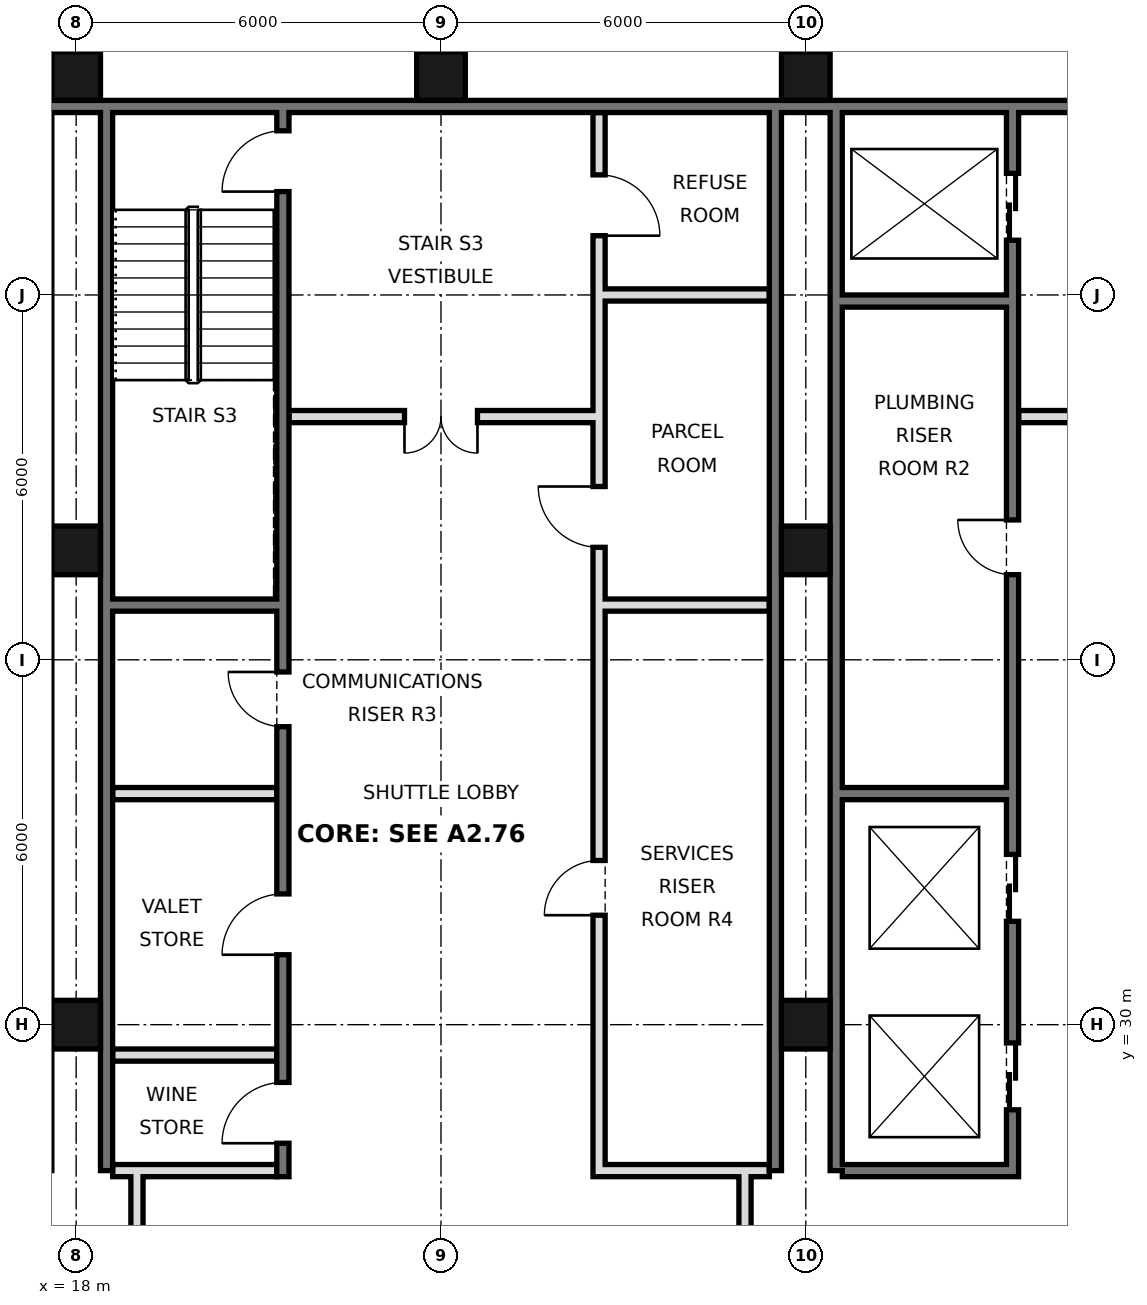
"""IFC4 building model, lengths in metres.
Left out: names, types, materials, properties, quantities, classifications, styles, units other than length and angle.
Written with IfcOpenShell. Run it as: python <this file> out.ifc"""

import sys

from ifc_helpers import new_model, si_unit, direction, frame, frame_2d, origin, origin_2d, place, context, subcontext, project, spatial, rectangle, hollow_rectangle, extrude, element, fill, save


model = new_model("IFC4")
c1 = context("Model", 3, precision=1e-05, world=origin(), true_north=direction((0.0, 1.0)))
c2 = subcontext(c1, "Body", "Model", "MODEL_VIEW")
j1 = project(units=[si_unit("LENGTHUNIT", "METRE"), si_unit("PLANEANGLEUNIT", "RADIAN")], contexts=[c1])
p1 = place(None, origin())
s1 = spatial("IfcSite", under=j1, at=p1, CompositionType="ELEMENT")
p2 = place(p1, origin())
s2 = spatial("IfcBuilding", under=s1, at=p2, CompositionType="ELEMENT")
p3 = place(p2, frame((0.0, 0.0, 305.2)))
s3 = spatial("IfcBuildingStorey", under=s2, at=p3, CompositionType="ELEMENT", Elevation=305.2)
for number, where, z_axis, x_axis in (
    (1, (18.0, 30.0, 0.0), (0.0, 0.0, 1.0), (1.0, 0.0, 0.0)),
    (2, (18.0, 37.8, 0.0), (0.0, 0.0, 1.0), (1.0, 0.0, 0.0)),
    (3, (18.0, 45.6, 0.0), (0.0, 0.0, 1.0), (1.0, 0.0, 0.0)),
    (4, (24.0, 45.6, 0.0), (0.0, 0.0, 1.0), (1.0, 0.0, 0.0)),
    (5, (30.0, 30.0, 0.0), (0.0, 0.0, 1.0), (1.0, 0.0, 0.0)),
    (6, (30.0, 37.8, 0.0), (0.0, 0.0, 1.0), (1.0, 0.0, 0.0)),
    (7, (30.0, 45.6, 0.0), (0.0, 0.0, 1.0), (1.0, 0.0, 0.0)),
):
    element("IfcColumn", number, at=place(p3, frame(where, z_axis=z_axis, x_axis=x_axis)), inside=s3, PredefinedType="COLUMN", context=c2, shape_type="SweptSolid", body=[
        extrude(hollow_rectangle(XDim=0.8, YDim=0.8, WallThickness=0.025, at=origin_2d()), origin(), (0.0, 0.0, 1.0), 3.6),
    ])
p4 = place(p3, frame((6.6, 45.1, 0.0), z_axis=(0.0, 0.0, 1.0), x_axis=(1.0, 0.0, 0.0)))
e8 = element("IfcWall", 8, at=p4, inside=s3, PredefinedType="SOLIDWALL", context=c2, shape_type="SweptSolid", body=[
    extrude(rectangle(XDim=34.8, YDim=0.2, at=frame_2d((17.4, 0.0))), origin(), (0.0, 0.0, 1.0), 3.42),
])
for number, where, z_axis, x_axis in (
    (9, (18.5, 27.6, 0.0), (0.0, 0.0, 1.0), (0.0, 1.0, 0.0)),
    (10, (29.5, 27.6, 0.0), (0.0, 0.0, 1.0), (0.0, 1.0, 0.0)),
    (11, (30.5, 27.6, 0.0), (0.0, 0.0, 1.0), (0.0, 1.0, 0.0)),
):
    element("IfcWall", number, at=place(p3, frame(where, z_axis=z_axis, x_axis=x_axis)), inside=s3, PredefinedType="SOLIDWALL", context=c2, shape_type="SweptSolid", body=[
        extrude(rectangle(XDim=17.5, YDim=0.2, at=frame_2d((8.75, 0.0))), origin(), (0.0, 0.0, 1.0), 3.42),
    ])
p5 = place(p3, frame((19.0, 21.6, 0.0), z_axis=(0.0, 0.0, 1.0), x_axis=(0.0, 1.0, 0.0)))
e12 = element("IfcWall", 12, at=p5, inside=s3, PredefinedType="PARTITIONING", context=c2, shape_type="SweptSolid", body=[
    extrude(rectangle(XDim=6.0, YDim=0.2, at=frame_2d((3.0, 0.0))), origin(), (0.0, 0.0, 1.0), 3.42),
])
p6 = place(p5, frame((2.1, 0.0, 0.0)))
e13 = element("IfcOpeningElement", 13, at=p6, cuts=e12, PredefinedType="OPENING", context=c2, shape_type="SweptSolid", body=[
    extrude(rectangle(XDim=1.8, YDim=2.1, at=frame_2d((0.9, 1.05))), frame((0.0, 0.11, 0.0), z_axis=(0.0, -1.0, 0.0), x_axis=(1.0, 0.0, 0.0)), (0.0, 0.0, 1.0), 0.22),
])
p7 = place(p3, frame((29.0, 21.6, 0.0), z_axis=(0.0, 0.0, 1.0), x_axis=(0.0, 1.0, 0.0)))
e14 = element("IfcWall", 14, at=p7, inside=s3, PredefinedType="PARTITIONING", context=c2, shape_type="SweptSolid", body=[
    extrude(rectangle(XDim=6.0, YDim=0.2, at=frame_2d((3.0, 0.0))), origin(), (0.0, 0.0, 1.0), 3.42),
])
p8 = place(p7, frame((2.1, 0.0, 0.0)))
e15 = element("IfcOpeningElement", 15, at=p8, cuts=e14, PredefinedType="OPENING", context=c2, shape_type="SweptSolid", body=[
    extrude(rectangle(XDim=1.8, YDim=2.1, at=frame_2d((0.9, 1.05))), frame((0.0, 0.11, 0.0), z_axis=(0.0, -1.0, 0.0), x_axis=(1.0, 0.0, 0.0)), (0.0, 0.0, 1.0), 0.22),
])
p9 = place(p3, frame((21.4, 27.5, 0.0), z_axis=(0.0, 0.0, 1.0), x_axis=(0.0, 1.0, 0.0)))
e16 = element("IfcWall", 16, at=p9, inside=s3, PredefinedType="SOLIDWALL", context=c2, shape_type="SweptSolid", body=[
    extrude(rectangle(XDim=17.5, YDim=0.2, at=frame_2d((8.75, 0.0))), origin(), (0.0, 0.0, 1.0), 3.42),
])
p10 = place(p9, frame((0.55, 0.0, 0.0)))
e17 = element("IfcOpeningElement", 17, at=p10, cuts=e16, PredefinedType="OPENING", context=c2, shape_type="SweptSolid", body=[
    extrude(rectangle(XDim=1.0, YDim=2.1, at=frame_2d((0.5, 1.05))), frame((0.0, 0.11, 0.0), z_axis=(0.0, -1.0, 0.0), x_axis=(1.0, 0.0, 0.0)), (0.0, 0.0, 1.0), 0.22),
])
p11 = place(p9, frame((3.65, 0.0, 0.0)))
e18 = element("IfcOpeningElement", 18, at=p11, cuts=e16, PredefinedType="OPENING", context=c2, shape_type="SweptSolid", body=[
    extrude(rectangle(XDim=1.0, YDim=2.1, at=frame_2d((0.5, 1.05))), frame((0.0, 0.11, 0.0), z_axis=(0.0, -1.0, 0.0), x_axis=(1.0, 0.0, 0.0)), (0.0, 0.0, 1.0), 0.22),
])
p12 = place(p9, frame((16.2, 0.0, 0.0)))
e19 = element("IfcOpeningElement", 19, at=p12, cuts=e16, PredefinedType="OPENING", context=c2, shape_type="SweptSolid", body=[
    extrude(rectangle(XDim=1.0, YDim=2.1, at=frame_2d((0.5, 1.05))), frame((0.0, 0.11, 0.0), z_axis=(0.0, -1.0, 0.0), x_axis=(1.0, 0.0, 0.0)), (0.0, 0.0, 1.0), 0.22),
])
p13 = place(p9, frame((7.4, 0.0, 0.0)))
e20 = element("IfcOpeningElement", 20, at=p13, cuts=e16, PredefinedType="OPENING", context=c2, shape_type="SweptSolid", body=[
    extrude(rectangle(XDim=0.9, YDim=2.1, at=frame_2d((0.45, 1.05))), frame((0.0, 0.11, 0.0), z_axis=(0.0, -1.0, 0.0), x_axis=(1.0, 0.0, 0.0)), (0.0, 0.0, 1.0), 0.22),
])
p14 = place(p3, frame((26.6, 27.5, 0.0), z_axis=(0.0, 0.0, 1.0), x_axis=(0.0, 1.0, 0.0)))
e21 = element("IfcWall", 21, at=p14, inside=s3, PredefinedType="SOLIDWALL", context=c2, shape_type="SweptSolid", body=[
    extrude(rectangle(XDim=17.5, YDim=0.2, at=frame_2d((8.75, 0.0))), origin(), (0.0, 0.0, 1.0), 3.42),
])
p15 = place(p14, frame((4.3, 0.0, 0.0)))
e22 = element("IfcOpeningElement", 22, at=p15, cuts=e21, PredefinedType="OPENING", context=c2, shape_type="SweptSolid", body=[
    extrude(rectangle(XDim=0.9, YDim=2.1, at=frame_2d((0.45, 1.05))), frame((0.0, 0.11, 0.0), z_axis=(0.0, -1.0, 0.0), x_axis=(1.0, 0.0, 0.0)), (0.0, 0.0, 1.0), 0.22),
])
p16 = place(p14, frame((10.35, 0.0, 0.0)))
e23 = element("IfcOpeningElement", 23, at=p16, cuts=e21, PredefinedType="OPENING", context=c2, shape_type="SweptSolid", body=[
    extrude(rectangle(XDim=1.0, YDim=2.1, at=frame_2d((0.5, 1.05))), frame((0.0, 0.11, 0.0), z_axis=(0.0, -1.0, 0.0), x_axis=(1.0, 0.0, 0.0)), (0.0, 0.0, 1.0), 0.22),
])
p17 = place(p14, frame((15.475, 0.0, 0.0)))
e24 = element("IfcOpeningElement", 24, at=p17, cuts=e21, PredefinedType="OPENING", context=c2, shape_type="SweptSolid", body=[
    extrude(rectangle(XDim=1.0, YDim=2.1, at=frame_2d((0.5, 1.05))), frame((0.0, 0.11, 0.0), z_axis=(0.0, -1.0, 0.0), x_axis=(1.0, 0.0, 0.0)), (0.0, 0.0, 1.0), 0.22),
])
p18 = place(p3, frame((33.4, 27.5, 0.0), z_axis=(0.0, 0.0, 1.0), x_axis=(0.0, 1.0, 0.0)))
e25 = element("IfcWall", 25, at=p18, inside=s3, PredefinedType="SOLIDWALL", context=c2, shape_type="SweptSolid", body=[
    extrude(rectangle(XDim=17.5, YDim=0.2, at=frame_2d((8.75, 0.0))), origin(), (0.0, 0.0, 1.0), 3.42),
])
p19 = place(p18, frame((1.1, 0.0, 0.0)))
e26 = element("IfcOpeningElement", 26, at=p19, cuts=e25, PredefinedType="OPENING", context=c2, shape_type="SweptSolid", body=[
    extrude(rectangle(XDim=1.1, YDim=2.1, at=frame_2d((0.55, 1.05))), frame((0.0, 0.11, 0.0), z_axis=(0.0, -1.0, 0.0), x_axis=(1.0, 0.0, 0.0)), (0.0, 0.0, 1.0), 0.22),
])
p20 = place(p18, frame((4.2, 0.0, 0.0)))
e27 = element("IfcOpeningElement", 27, at=p20, cuts=e25, PredefinedType="OPENING", context=c2, shape_type="SweptSolid", body=[
    extrude(rectangle(XDim=1.1, YDim=2.1, at=frame_2d((0.55, 1.05))), frame((0.0, 0.11, 0.0), z_axis=(0.0, -1.0, 0.0), x_axis=(1.0, 0.0, 0.0)), (0.0, 0.0, 1.0), 0.22),
])
p21 = place(p18, frame((15.4, 0.0, 0.0)))
e28 = element("IfcOpeningElement", 28, at=p21, cuts=e25, PredefinedType="OPENING", context=c2, shape_type="SweptSolid", body=[
    extrude(rectangle(XDim=1.1, YDim=2.1, at=frame_2d((0.55, 1.05))), frame((0.0, 0.11, 0.0), z_axis=(0.0, -1.0, 0.0), x_axis=(1.0, 0.0, 0.0)), (0.0, 0.0, 1.0), 0.22),
])
p22 = place(p18, frame((9.9, 0.0, 0.0)))
e29 = element("IfcOpeningElement", 29, at=p22, cuts=e25, PredefinedType="OPENING", context=c2, shape_type="SweptSolid", body=[
    extrude(rectangle(XDim=0.9, YDim=2.1, at=frame_2d((0.45, 1.05))), frame((0.0, 0.11, 0.0), z_axis=(0.0, -1.0, 0.0), x_axis=(1.0, 0.0, 0.0)), (0.0, 0.0, 1.0), 0.22),
])
p23 = place(p3, frame((18.6, 27.6, 0.0), z_axis=(0.0, 0.0, 1.0), x_axis=(1.0, 0.0, 0.0)))
e30 = element("IfcWall", 30, at=p23, inside=s3, PredefinedType="PARTITIONING", context=c2, shape_type="SweptSolid", body=[
    extrude(rectangle(XDim=2.7, YDim=0.2, at=frame_2d((1.35, 0.0))), origin(), (0.0, 0.0, 1.0), 3.42),
])
for number, where, z_axis, x_axis in (
    (31, (26.7, 27.6, 0.0), (0.0, 0.0, 1.0), (1.0, 0.0, 0.0)),
    (32, (30.6, 27.6, 0.0), (0.0, 0.0, 1.0), (1.0, 0.0, 0.0)),
):
    element("IfcWall", number, at=place(p3, frame(where, z_axis=z_axis, x_axis=x_axis)), inside=s3, PredefinedType="SOLIDWALL", context=c2, shape_type="SweptSolid", body=[
        extrude(rectangle(XDim=2.7, YDim=0.2, at=frame_2d((1.35, 0.0))), origin(), (0.0, 0.0, 1.0), 3.42),
    ])
p24 = place(p3, frame((18.6, 29.5, 0.0), z_axis=(0.0, 0.0, 1.0), x_axis=(1.0, 0.0, 0.0)))
e33 = element("IfcWall", 33, at=p24, inside=s3, PredefinedType="PARTITIONING", context=c2, shape_type="SweptSolid", body=[
    extrude(rectangle(XDim=2.7, YDim=0.2, at=frame_2d((1.35, 0.0))), origin(), (0.0, 0.0, 1.0), 3.42),
])
for number, where, z_axis, x_axis in (
    (34, (18.6, 33.8, 0.0), (0.0, 0.0, 1.0), (1.0, 0.0, 0.0)),
    (35, (30.6, 33.8, 0.0), (0.0, 0.0, 1.0), (1.0, 0.0, 0.0)),
    (36, (18.6, 36.9, 0.0), (0.0, 0.0, 1.0), (1.0, 0.0, 0.0)),
    (37, (26.7, 36.9, 0.0), (0.0, 0.0, 1.0), (1.0, 0.0, 0.0)),
):
    element("IfcWall", number, at=place(p3, frame(where, z_axis=z_axis, x_axis=x_axis)), inside=s3, PredefinedType="SOLIDWALL", context=c2, shape_type="SweptSolid", body=[
        extrude(rectangle(XDim=2.7, YDim=0.2, at=frame_2d((1.35, 0.0))), origin(), (0.0, 0.0, 1.0), 3.42),
    ])
p25 = place(p3, frame((21.5, 40.0, 0.0), z_axis=(0.0, 0.0, 1.0), x_axis=(1.0, 0.0, 0.0)))
e38 = element("IfcWall", 38, at=p25, inside=s3, PredefinedType="PARTITIONING", context=c2, shape_type="SweptSolid", body=[
    extrude(rectangle(XDim=5.0, YDim=0.2, at=frame_2d((2.5, 0.0))), origin(), (0.0, 0.0, 1.0), 3.42),
])
p26 = place(p25, frame((1.9, 0.0, 0.0)))
e39 = element("IfcOpeningElement", 39, at=p26, cuts=e38, PredefinedType="OPENING", context=c2, shape_type="SweptSolid", body=[
    extrude(rectangle(XDim=1.2, YDim=2.1, at=frame_2d((0.6, 1.05))), frame((0.0, 0.11, 0.0), z_axis=(0.0, -1.0, 0.0), x_axis=(1.0, 0.0, 0.0)), (0.0, 0.0, 1.0), 0.22),
])
p27 = place(p3, frame((33.5, 40.0, 0.0), z_axis=(0.0, 0.0, 1.0), x_axis=(1.0, 0.0, 0.0)))
e40 = element("IfcWall", 40, at=p27, inside=s3, PredefinedType="PARTITIONING", context=c2, shape_type="SweptSolid", body=[
    extrude(rectangle(XDim=5.0, YDim=0.2, at=frame_2d((2.5, 0.0))), origin(), (0.0, 0.0, 1.0), 3.42),
])
p28 = place(p27, frame((1.9, 0.0, 0.0)))
e41 = element("IfcOpeningElement", 41, at=p28, cuts=e40, PredefinedType="OPENING", context=c2, shape_type="SweptSolid", body=[
    extrude(rectangle(XDim=1.2, YDim=2.1, at=frame_2d((0.6, 1.05))), frame((0.0, 0.11, 0.0), z_axis=(0.0, -1.0, 0.0), x_axis=(1.0, 0.0, 0.0)), (0.0, 0.0, 1.0), 0.22),
])
p29 = place(p3, frame((30.6, 41.9, 0.0), z_axis=(0.0, 0.0, 1.0), x_axis=(1.0, 0.0, 0.0)))
e42 = element("IfcWall", 42, at=p29, inside=s3, PredefinedType="SOLIDWALL", context=c2, shape_type="SweptSolid", body=[
    extrude(rectangle(XDim=2.7, YDim=0.2, at=frame_2d((1.35, 0.0))), origin(), (0.0, 0.0, 1.0), 3.42),
])
p30 = place(p3, frame((26.7, 42.0, 0.0), z_axis=(0.0, 0.0, 1.0), x_axis=(1.0, 0.0, 0.0)))
e43 = element("IfcWall", 43, at=p30, inside=s3, PredefinedType="PARTITIONING", context=c2, shape_type="SweptSolid", body=[
    extrude(rectangle(XDim=2.7, YDim=0.2, at=frame_2d((1.35, 0.0))), origin(), (0.0, 0.0, 1.0), 3.42),
])
p31 = place(p26, frame((1.2, 0.0, 0.0), z_axis=(0.0, 0.0, 1.0), x_axis=(-1.0, 0.0, 0.0)))
e44 = element("IfcDoor", 44, at=p31, inside=s3, OperationType="DOUBLE_DOOR_SINGLE_SWING", PredefinedType="DOOR", context=c2, shape_type="SweptSolid", body=[
    extrude(rectangle(XDim=1.2, YDim=2.1, at=frame_2d((0.6, 1.05))), frame((0.0, 0.025, 0.0), z_axis=(0.0, -1.0, 0.0), x_axis=(1.0, 0.0, 0.0)), (0.0, 0.0, 1.0), 0.05),
])
fill(e39, e44)
p32 = place(p19, origin())
e45 = element("IfcDoor", 45, at=p32, inside=s3, OperationType="DOUBLE_DOOR_SLIDING", PredefinedType="DOOR", context=c2, shape_type="SweptSolid", body=[
    extrude(rectangle(XDim=1.1, YDim=2.1, at=frame_2d((0.55, 1.05))), frame((0.0, 0.025, 0.0), z_axis=(0.0, -1.0, 0.0), x_axis=(1.0, 0.0, 0.0)), (0.0, 0.0, 1.0), 0.05),
])
fill(e26, e45)
p33 = place(p20, origin())
e46 = element("IfcDoor", 46, at=p33, inside=s3, OperationType="DOUBLE_DOOR_SLIDING", PredefinedType="DOOR", context=c2, shape_type="SweptSolid", body=[
    extrude(rectangle(XDim=1.1, YDim=2.1, at=frame_2d((0.55, 1.05))), frame((0.0, 0.025, 0.0), z_axis=(0.0, -1.0, 0.0), x_axis=(1.0, 0.0, 0.0)), (0.0, 0.0, 1.0), 0.05),
])
fill(e27, e46)
p34 = place(p21, origin())
e47 = element("IfcDoor", 47, at=p34, inside=s3, OperationType="DOUBLE_DOOR_SLIDING", PredefinedType="DOOR", context=c2, shape_type="SweptSolid", body=[
    extrude(rectangle(XDim=1.1, YDim=2.1, at=frame_2d((0.55, 1.05))), frame((0.0, 0.025, 0.0), z_axis=(0.0, -1.0, 0.0), x_axis=(1.0, 0.0, 0.0)), (0.0, 0.0, 1.0), 0.05),
])
fill(e28, e47)
p35 = place(p10, origin())
e48 = element("IfcDoor", 48, at=p35, inside=s3, OperationType="SINGLE_SWING_LEFT", PredefinedType="DOOR", context=c2, shape_type="SweptSolid", body=[
    extrude(rectangle(XDim=1.0, YDim=2.1, at=frame_2d((0.5, 1.05))), frame((0.0, 0.025, 0.0), z_axis=(0.0, -1.0, 0.0), x_axis=(1.0, 0.0, 0.0)), (0.0, 0.0, 1.0), 0.05),
])
fill(e17, e48)
p36 = place(p11, origin())
e49 = element("IfcDoor", 49, at=p36, inside=s3, OperationType="SINGLE_SWING_LEFT", PredefinedType="DOOR", context=c2, shape_type="SweptSolid", body=[
    extrude(rectangle(XDim=1.0, YDim=2.1, at=frame_2d((0.5, 1.05))), frame((0.0, 0.025, 0.0), z_axis=(0.0, -1.0, 0.0), x_axis=(1.0, 0.0, 0.0)), (0.0, 0.0, 1.0), 0.05),
])
fill(e18, e49)
p37 = place(p12, origin())
e50 = element("IfcDoor", 50, at=p37, inside=s3, OperationType="SINGLE_SWING_LEFT", PredefinedType="DOOR", context=c2, shape_type="SweptSolid", body=[
    extrude(rectangle(XDim=1.0, YDim=2.1, at=frame_2d((0.5, 1.05))), frame((0.0, 0.025, 0.0), z_axis=(0.0, -1.0, 0.0), x_axis=(1.0, 0.0, 0.0)), (0.0, 0.0, 1.0), 0.05),
])
fill(e19, e50)
p38 = place(p22, frame((0.9, 0.0, 0.0), z_axis=(0.0, 0.0, 1.0), x_axis=(-1.0, 0.0, 0.0)))
e51 = element("IfcDoor", 51, at=p38, inside=s3, OperationType="SINGLE_SWING_LEFT", PredefinedType="DOOR", context=c2, shape_type="SweptSolid", body=[
    extrude(rectangle(XDim=0.9, YDim=2.1, at=frame_2d((0.45, 1.05))), frame((0.0, 0.025, 0.0), z_axis=(0.0, -1.0, 0.0), x_axis=(1.0, 0.0, 0.0)), (0.0, 0.0, 1.0), 0.05),
])
fill(e29, e51)
p39 = place(p13, frame((0.9, 0.0, 0.0), z_axis=(0.0, 0.0, 1.0), x_axis=(-1.0, 0.0, 0.0)))
e52 = element("IfcDoor", 52, at=p39, inside=s3, OperationType="SINGLE_SWING_LEFT", PredefinedType="DOOR", context=c2, shape_type="SweptSolid", body=[
    extrude(rectangle(XDim=0.9, YDim=2.1, at=frame_2d((0.45, 1.05))), frame((0.0, 0.025, 0.0), z_axis=(0.0, -1.0, 0.0), x_axis=(1.0, 0.0, 0.0)), (0.0, 0.0, 1.0), 0.05),
])
fill(e20, e52)
p40 = place(p15, origin())
e53 = element("IfcDoor", 53, at=p40, inside=s3, OperationType="SINGLE_SWING_LEFT", PredefinedType="DOOR", context=c2, shape_type="SweptSolid", body=[
    extrude(rectangle(XDim=0.9, YDim=2.1, at=frame_2d((0.45, 1.05))), frame((0.0, 0.025, 0.0), z_axis=(0.0, -1.0, 0.0), x_axis=(1.0, 0.0, 0.0)), (0.0, 0.0, 1.0), 0.05),
])
fill(e22, e53)
p41 = place(p16, frame((1.0, 0.0, 0.0), z_axis=(0.0, 0.0, 1.0), x_axis=(-1.0, 0.0, 0.0)))
e54 = element("IfcDoor", 54, at=p41, inside=s3, OperationType="SINGLE_SWING_LEFT", PredefinedType="DOOR", context=c2, shape_type="SweptSolid", body=[
    extrude(rectangle(XDim=1.0, YDim=2.1, at=frame_2d((0.5, 1.05))), frame((0.0, 0.025, 0.0), z_axis=(0.0, -1.0, 0.0), x_axis=(1.0, 0.0, 0.0)), (0.0, 0.0, 1.0), 0.05),
])
fill(e23, e54)
p42 = place(p17, frame((1.0, 0.0, 0.0), z_axis=(0.0, 0.0, 1.0), x_axis=(-1.0, 0.0, 0.0)))
e55 = element("IfcDoor", 55, at=p42, inside=s3, OperationType="SINGLE_SWING_RIGHT", PredefinedType="DOOR", context=c2, shape_type="SweptSolid", body=[
    extrude(rectangle(XDim=1.0, YDim=2.1, at=frame_2d((0.5, 1.05))), frame((0.0, 0.025, 0.0), z_axis=(0.0, -1.0, 0.0), x_axis=(1.0, 0.0, 0.0)), (0.0, 0.0, 1.0), 0.05),
])
fill(e24, e55)
save(model, sys.argv[1])
